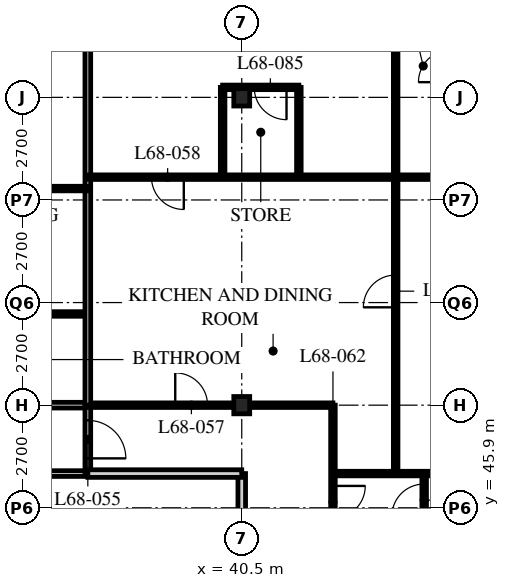
"""IFC4 building model, lengths in metres.
Left out: names, types, materials, properties, quantities, classifications, styles, units other than length and angle.
Written with IfcOpenShell. Run it as: python <this file> out.ifc"""

import sys

from ifc_helpers import new_model, si_unit, direction, frame, frame_2d, origin, origin_2d, place, context, subcontext, project, spatial, rectangle, i_section, extrude, element, fill, save


model = new_model("IFC4")
c1 = context("Model", 3, precision=1e-05, world=origin(), true_north=direction((0.0, 1.0)))
c2 = subcontext(c1, "Body", "Model", "MODEL_VIEW")
j1 = project(units=[si_unit("LENGTHUNIT", "METRE"), si_unit("PLANEANGLEUNIT", "RADIAN")], contexts=[c1])
p1 = place(None, origin())
s1 = spatial("IfcSite", under=j1, at=p1, CompositionType="ELEMENT")
p2 = place(p1, origin())
s2 = spatial("IfcBuilding", under=s1, at=p2, CompositionType="ELEMENT")
p3 = place(p2, frame((0.0, 0.0, 265.8)))
s3 = spatial("IfcBuildingStorey", under=s2, at=p3, CompositionType="ELEMENT", Elevation=265.8)
for number, where, z_axis, x_axis in (
    (1, (40.5, 48.6, 0.0), (0.0, 0.0, 1.0), (1.0, 0.0, 0.0)),
    (2, (40.5, 56.7, 0.0), (0.0, 0.0, 1.0), (1.0, 0.0, 0.0)),
):
    element("IfcColumn", number, at=place(p3, frame(where, z_axis=z_axis, x_axis=x_axis)), inside=s3, PredefinedType="COLUMN", context=c2, shape_type="SweptSolid", body=[
        extrude(i_section(OverallWidth=0.418, OverallDepth=0.456, WebThickness=0.042, FlangeThickness=0.067, FilletRadius=0.015, at=origin_2d()), origin(), (0.0, 0.0, 1.0), 3.9),
    ])
p4 = place(p3, frame((8.1, 48.6, 0.0), z_axis=(0.0, 0.0, 1.0), x_axis=(1.0, 0.0, 0.0)))
e3 = element("IfcWall", 3, at=p4, inside=s3, PredefinedType="PARTITIONING", context=c2, shape_type="SweptSolid", body=[
    extrude(rectangle(XDim=28.35, YDim=0.15, at=frame_2d((14.175, 0.0))), origin(), (0.0, 0.0, 1.0), 3.078),
])
p5 = place(p4, frame((4.45, 0.0, 0.0)))
e4 = element("IfcOpeningElement", 4, at=p5, cuts=e3, PredefinedType="OPENING", context=c2, shape_type="SweptSolid", body=[
    extrude(rectangle(XDim=1.0, YDim=2.1, at=frame_2d((0.5, 1.05))), frame((0.0, 0.085, 0.0), z_axis=(0.0, -1.0, 0.0), x_axis=(1.0, 0.0, 0.0)), (0.0, 0.0, 1.0), 0.17),
])
p6 = place(p4, frame((20.65, 0.0, 0.0)))
e5 = element("IfcOpeningElement", 5, at=p6, cuts=e3, PredefinedType="OPENING", context=c2, shape_type="SweptSolid", body=[
    extrude(rectangle(XDim=1.0, YDim=2.1, at=frame_2d((0.5, 1.05))), frame((0.0, 0.085, 0.0), z_axis=(0.0, -1.0, 0.0), x_axis=(1.0, 0.0, 0.0)), (0.0, 0.0, 1.0), 0.17),
])
p7 = place(p4, frame((1.525, 0.0, 0.0)))
e6 = element("IfcOpeningElement", 6, at=p7, cuts=e3, PredefinedType="OPENING", context=c2, shape_type="SweptSolid", body=[
    extrude(rectangle(XDim=1.0, YDim=2.1, at=frame_2d((0.5, 1.05))), frame((0.0, 0.085, 0.0), z_axis=(0.0, -1.0, 0.0), x_axis=(1.0, 0.0, 0.0)), (0.0, 0.0, 1.0), 0.17),
])
p8 = place(p3, frame((29.56, 46.8, 0.0), z_axis=(0.0, 0.0, 1.0), x_axis=(1.0, 0.0, 0.0)))
e7 = element("IfcWall", 7, at=p8, inside=s3, PredefinedType="PARTITIONING", context=c2, shape_type="SweptSolid", body=[
    extrude(rectangle(XDim=6.89, YDim=0.15, at=frame_2d((3.445, 0.0))), origin(), (0.0, 0.0, 1.0), 3.69),
])
p9 = place(p8, frame((0.442, 0.0, 0.0)))
e8 = element("IfcOpeningElement", 8, at=p9, cuts=e7, PredefinedType="OPENING", context=c2, shape_type="SweptSolid", body=[
    extrude(rectangle(XDim=1.0, YDim=2.1, at=frame_2d((0.5, 1.05))), frame((0.0, 0.085, 0.0), z_axis=(0.0, -1.0, 0.0), x_axis=(1.0, 0.0, 0.0)), (0.0, 0.0, 1.0), 0.17),
])
p10 = place(p8, frame((3.642, 0.0, 0.0)))
e9 = element("IfcOpeningElement", 9, at=p10, cuts=e7, PredefinedType="OPENING", context=c2, shape_type="SweptSolid", body=[
    extrude(rectangle(XDim=1.0, YDim=2.1, at=frame_2d((0.5, 1.05))), frame((0.0, 0.085, 0.0), z_axis=(0.0, -1.0, 0.0), x_axis=(1.0, 0.0, 0.0)), (0.0, 0.0, 1.0), 0.17),
])
p11 = place(p3, frame((36.45, 46.8, 0.0), z_axis=(0.0, 0.0, 1.0), x_axis=(0.0, 1.0, 0.0)))
e10 = element("IfcWall", 10, at=p11, inside=s3, PredefinedType="PARTITIONING", context=c2, shape_type="SweptSolid", body=[
    extrude(rectangle(XDim=1.8, YDim=0.15, at=frame_2d((0.9, 0.0))), origin(), (0.0, 0.0, 1.0), 3.69),
])
p12 = place(p11, frame((0.4, 0.0, 0.0)))
e11 = element("IfcOpeningElement", 11, at=p12, cuts=e10, PredefinedType="OPENING", context=c2, shape_type="SweptSolid", body=[
    extrude(rectangle(XDim=1.0, YDim=2.1, at=frame_2d((0.5, 1.05))), frame((0.0, 0.085, 0.0), z_axis=(0.0, -1.0, 0.0), x_axis=(1.0, 0.0, 0.0)), (0.0, 0.0, 1.0), 0.17),
])
p13 = place(p3, frame((40.5, 40.5, 0.0), z_axis=(0.0, 0.0, 1.0), x_axis=(0.0, 1.0, 0.0)))
e12 = element("IfcWall", 12, at=p13, inside=s3, PredefinedType="SOLIDWALL", context=c2, shape_type="SweptSolid", body=[
    extrude(rectangle(XDim=6.3, YDim=0.2, at=frame_2d((3.15, 0.0))), origin(), (0.0, 0.0, 1.0), 3.078),
])
p14 = place(p3, frame((4.1, 51.0, 0.0), z_axis=(0.0, 0.0, 1.0), x_axis=(1.0, 0.0, 0.0)))
e13 = element("IfcWall", 13, at=p14, inside=s3, PredefinedType="PARTITIONING", context=c2, shape_type="SweptSolid", body=[
    extrude(rectangle(XDim=32.35, YDim=0.12, at=frame_2d((16.175, 0.0))), origin(), (0.0, 0.0, 1.0), 3.69),
])
p15 = place(p14, frame((9.025, 0.0, 0.0)))
e14 = element("IfcOpeningElement", 14, at=p15, cuts=e13, PredefinedType="OPENING", context=c2, shape_type="SweptSolid", body=[
    extrude(rectangle(XDim=0.85, YDim=2.1, at=frame_2d((0.425, 1.05))), frame((0.0, 0.07, 0.0), z_axis=(0.0, -1.0, 0.0), x_axis=(1.0, 0.0, 0.0)), (0.0, 0.0, 1.0), 0.14),
])
p16 = place(p14, frame((16.475, 0.0, 0.0)))
e15 = element("IfcOpeningElement", 15, at=p16, cuts=e13, PredefinedType="OPENING", context=c2, shape_type="SweptSolid", body=[
    extrude(rectangle(XDim=0.85, YDim=2.1, at=frame_2d((0.425, 1.05))), frame((0.0, 0.07, 0.0), z_axis=(0.0, -1.0, 0.0), x_axis=(1.0, 0.0, 0.0)), (0.0, 0.0, 1.0), 0.14),
])
p17 = place(p14, frame((20.525, 0.0, 0.0)))
e16 = element("IfcOpeningElement", 16, at=p17, cuts=e13, PredefinedType="OPENING", context=c2, shape_type="SweptSolid", body=[
    extrude(rectangle(XDim=0.85, YDim=2.1, at=frame_2d((0.425, 1.05))), frame((0.0, 0.07, 0.0), z_axis=(0.0, -1.0, 0.0), x_axis=(1.0, 0.0, 0.0)), (0.0, 0.0, 1.0), 0.14),
])
p18 = place(p14, frame((25.225, 0.0, 0.0)))
e17 = element("IfcOpeningElement", 17, at=p18, cuts=e13, PredefinedType="OPENING", context=c2, shape_type="SweptSolid", body=[
    extrude(rectangle(XDim=0.85, YDim=2.1, at=frame_2d((0.425, 1.05))), frame((0.0, 0.07, 0.0), z_axis=(0.0, -1.0, 0.0), x_axis=(1.0, 0.0, 0.0)), (0.0, 0.0, 1.0), 0.14),
])
p19 = place(p14, frame((28.625, 0.0, 0.0)))
e18 = element("IfcOpeningElement", 18, at=p19, cuts=e13, PredefinedType="OPENING", context=c2, shape_type="SweptSolid", body=[
    extrude(rectangle(XDim=0.85, YDim=2.1, at=frame_2d((0.425, 1.05))), frame((0.0, 0.07, 0.0), z_axis=(0.0, -1.0, 0.0), x_axis=(1.0, 0.0, 0.0)), (0.0, 0.0, 1.0), 0.14),
])
p20 = place(p14, frame((6.725, 0.0, 0.0)))
e19 = element("IfcOpeningElement", 19, at=p20, cuts=e13, PredefinedType="OPENING", context=c2, shape_type="SweptSolid", body=[
    extrude(rectangle(XDim=0.85, YDim=2.1, at=frame_2d((0.425, 1.05))), frame((0.0, 0.07, 0.0), z_axis=(0.0, -1.0, 0.0), x_axis=(1.0, 0.0, 0.0)), (0.0, 0.0, 1.0), 0.14),
])
p21 = place(p14, frame((2.875, 0.0, 0.0)))
e20 = element("IfcOpeningElement", 20, at=p21, cuts=e13, PredefinedType="OPENING", context=c2, shape_type="SweptSolid", body=[
    extrude(rectangle(XDim=0.85, YDim=2.1, at=frame_2d((0.425, 1.05))), frame((0.0, 0.07, 0.0), z_axis=(0.0, -1.0, 0.0), x_axis=(1.0, 0.0, 0.0)), (0.0, 0.0, 1.0), 0.14),
])
p22 = place(p3, frame((42.9, 48.6, 0.0), z_axis=(0.0, 0.0, 1.0), x_axis=(0.0, -1.0, 0.0)))
e21 = element("IfcWall", 21, at=p22, inside=s3, PredefinedType="PARTITIONING", context=c2, shape_type="SweptSolid", body=[
    extrude(rectangle(XDim=16.2, YDim=0.12, at=frame_2d((8.1, 0.0))), origin(), (0.0, 0.0, 1.0), 3.69),
])
p23 = place(p22, frame((2.125, 0.0, 0.0)))
e22 = element("IfcOpeningElement", 22, at=p23, cuts=e21, PredefinedType="OPENING", context=c2, shape_type="SweptSolid", body=[
    extrude(rectangle(XDim=0.85, YDim=2.1, at=frame_2d((0.425, 1.05))), frame((0.0, 0.07, 0.0), z_axis=(0.0, -1.0, 0.0), x_axis=(1.0, 0.0, 0.0)), (0.0, 0.0, 1.0), 0.14),
])
p24 = place(p22, frame((8.425, 0.0, 0.0)))
e23 = element("IfcOpeningElement", 23, at=p24, cuts=e21, PredefinedType="OPENING", context=c2, shape_type="SweptSolid", body=[
    extrude(rectangle(XDim=0.85, YDim=2.1, at=frame_2d((0.425, 1.05))), frame((0.0, 0.07, 0.0), z_axis=(0.0, -1.0, 0.0), x_axis=(1.0, 0.0, 0.0)), (0.0, 0.0, 1.0), 0.14),
])
p25 = place(p22, frame((12.475, 0.0, 0.0)))
e24 = element("IfcOpeningElement", 24, at=p25, cuts=e21, PredefinedType="OPENING", context=c2, shape_type="SweptSolid", body=[
    extrude(rectangle(XDim=0.85, YDim=2.1, at=frame_2d((0.425, 1.05))), frame((0.0, 0.07, 0.0), z_axis=(0.0, -1.0, 0.0), x_axis=(1.0, 0.0, 0.0)), (0.0, 0.0, 1.0), 0.14),
])
p26 = place(p3, frame((36.45, 48.6, 0.0), z_axis=(0.0, 0.0, 1.0), x_axis=(1.0, 0.0, 0.0)))
e25 = element("IfcWall", 25, at=p26, inside=s3, PredefinedType="PARTITIONING", context=c2, shape_type="SweptSolid", body=[
    extrude(rectangle(XDim=6.45, YDim=0.12, at=frame_2d((3.225, 0.0))), origin(), (0.0, 0.0, 1.0), 3.078),
])
p27 = place(p26, frame((2.3, 0.0, 0.0)))
e26 = element("IfcOpeningElement", 26, at=p27, cuts=e25, PredefinedType="OPENING", context=c2, shape_type="SweptSolid", body=[
    extrude(rectangle(XDim=0.85, YDim=2.1, at=frame_2d((0.425, 1.05))), frame((0.0, 0.07, 0.0), z_axis=(0.0, -1.0, 0.0), x_axis=(1.0, 0.0, 0.0)), (0.0, 0.0, 1.0), 0.14),
])
p28 = place(p3, frame((36.45, 46.8, 0.0), z_axis=(0.0, 0.0, 1.0), x_axis=(1.0, 0.0, 0.0)))
e27 = element("IfcWall", 27, at=p28, inside=s3, PredefinedType="SOLIDWALL", context=c2, shape_type="SweptSolid", body=[
    extrude(rectangle(XDim=4.05, YDim=0.2, at=frame_2d((2.025, 0.0))), origin(), (0.0, 0.0, 1.0), 3.69),
])
p29 = place(p3, frame((42.9, 46.8, 0.0), z_axis=(0.0, 0.0, 1.0), x_axis=(1.0, 0.0, 0.0)))
e28 = element("IfcWall", 28, at=p29, inside=s3, PredefinedType="PARTITIONING", context=c2, shape_type="SweptSolid", body=[
    extrude(rectangle(XDim=13.5, YDim=0.12, at=frame_2d((6.75, 0.0))), origin(), (0.0, 0.0, 1.0), 3.69),
])
p30 = place(p3, frame((36.45, 64.5, 0.0), z_axis=(0.0, 0.0, 1.0), x_axis=(0.0, -1.0, 0.0)))
e29 = element("IfcWall", 29, at=p30, inside=s3, PredefinedType="PARTITIONING", context=c2, shape_type="SweptSolid", body=[
    extrude(rectangle(XDim=15.9, YDim=0.15, at=frame_2d((7.95, 0.0))), origin(), (0.0, 0.0, 1.0), 3.69),
])
p31 = place(p3, frame((36.45, 54.6, 0.0), z_axis=(0.0, 0.0, 1.0), x_axis=(1.0, 0.0, 0.0)))
e30 = element("IfcWall", 30, at=p31, inside=s3, PredefinedType="PARTITIONING", context=c2, shape_type="SweptSolid", body=[
    extrude(rectangle(XDim=19.95, YDim=0.12, at=frame_2d((9.975, 0.0))), origin(), (0.0, 0.0, 1.0), 3.69),
])
p32 = place(p31, frame((1.675, 0.0, 0.0)))
e31 = element("IfcOpeningElement", 31, at=p32, cuts=e30, PredefinedType="OPENING", context=c2, shape_type="SweptSolid", body=[
    extrude(rectangle(XDim=0.85, YDim=2.1, at=frame_2d((0.425, 1.05))), frame((0.0, 0.07, 0.0), z_axis=(0.0, -1.0, 0.0), x_axis=(1.0, 0.0, 0.0)), (0.0, 0.0, 1.0), 0.14),
])
p33 = place(p3, frame((44.55, 64.5, 0.0), z_axis=(0.0, 0.0, 1.0), x_axis=(0.0, -1.0, 0.0)))
e32 = element("IfcWall", 32, at=p33, inside=s3, PredefinedType="PARTITIONING", context=c2, shape_type="SweptSolid", body=[
    extrude(rectangle(XDim=17.7, YDim=0.12, at=frame_2d((8.85, 0.0))), origin(), (0.0, 0.0, 1.0), 3.69),
])
p34 = place(p33, frame((12.475, 0.0, 0.0)))
e33 = element("IfcOpeningElement", 33, at=p34, cuts=e32, PredefinedType="OPENING", context=c2, shape_type="SweptSolid", body=[
    extrude(rectangle(XDim=0.85, YDim=2.1, at=frame_2d((0.425, 1.05))), frame((0.0, 0.07, 0.0), z_axis=(0.0, -1.0, 0.0), x_axis=(1.0, 0.0, 0.0)), (0.0, 0.0, 1.0), 0.14),
])
p35 = place(p33, frame((4.525, 0.0, 0.0)))
e34 = element("IfcOpeningElement", 34, at=p35, cuts=e32, PredefinedType="OPENING", context=c2, shape_type="SweptSolid", body=[
    extrude(rectangle(XDim=0.85, YDim=2.1, at=frame_2d((0.425, 1.05))), frame((0.0, 0.07, 0.0), z_axis=(0.0, -1.0, 0.0), x_axis=(1.0, 0.0, 0.0)), (0.0, 0.0, 1.0), 0.14),
])
p36 = place(p3, frame((45.3, 46.8, 0.0), z_axis=(0.0, 0.0, 1.0), x_axis=(0.0, -1.0, 0.0)))
e35 = element("IfcWall", 35, at=p36, inside=s3, PredefinedType="PARTITIONING", context=c2, shape_type="SweptSolid", body=[
    extrude(rectangle(XDim=4.01, YDim=0.12, at=frame_2d((2.005, 0.0))), origin(), (0.0, 0.0, 1.0), 3.69),
])
p37 = place(p36, frame((0.275, 0.0, 0.0)))
e36 = element("IfcOpeningElement", 36, at=p37, cuts=e35, PredefinedType="OPENING", context=c2, shape_type="SweptSolid", body=[
    extrude(rectangle(XDim=0.85, YDim=2.1, at=frame_2d((0.425, 1.05))), frame((0.0, 0.07, 0.0), z_axis=(0.0, -1.0, 0.0), x_axis=(1.0, 0.0, 0.0)), (0.0, 0.0, 1.0), 0.14),
])
p38 = place(p3, frame((32.4, 54.3, 0.0), z_axis=(0.0, 0.0, 1.0), x_axis=(1.0, 0.0, 0.0)))
e37 = element("IfcWall", 37, at=p38, inside=s3, PredefinedType="PARTITIONING", context=c2, shape_type="SweptSolid", body=[
    extrude(rectangle(XDim=4.05, YDim=0.12, at=frame_2d((2.025, 0.0))), origin(), (0.0, 0.0, 1.0), 3.69),
])
p39 = place(p38, frame((1.6, 0.0, 0.0)))
e38 = element("IfcOpeningElement", 38, at=p39, cuts=e37, PredefinedType="OPENING", context=c2, shape_type="SweptSolid", body=[
    extrude(rectangle(XDim=0.85, YDim=2.1, at=frame_2d((0.425, 1.05))), frame((0.0, 0.07, 0.0), z_axis=(0.0, -1.0, 0.0), x_axis=(1.0, 0.0, 0.0)), (0.0, 0.0, 1.0), 0.14),
])
for number, where, z_axis, x_axis in (
    (39, (39.997, 54.6, 0.0), (0.0, 0.0, 1.0), (0.0, 1.0, 0.0)),
    (40, (42.003, 54.6, 0.0), (0.0, 0.0, 1.0), (0.0, 1.0, 0.0)),
):
    element("IfcWall", number, at=place(p3, frame(where, z_axis=z_axis, x_axis=x_axis)), inside=s3, PredefinedType="PARTITIONING", context=c2, shape_type="SweptSolid", body=[
        extrude(rectangle(XDim=2.363, YDim=0.12, at=frame_2d((1.181, 0.0))), origin(), (0.0, 0.0, 1.0), 3.69),
    ])
p40 = place(p3, frame((39.997, 56.963, 0.0), z_axis=(0.0, 0.0, 1.0), x_axis=(1.0, 0.0, 0.0)))
e41 = element("IfcWall", 41, at=p40, inside=s3, PredefinedType="PARTITIONING", context=c2, shape_type="SweptSolid", body=[
    extrude(rectangle(XDim=2.006, YDim=0.12, at=frame_2d((1.003, 0.0))), origin(), (0.0, 0.0, 1.0), 3.69),
])
p41 = place(p40, frame((0.831, 0.0, 0.0)))
e42 = element("IfcOpeningElement", 42, at=p41, cuts=e41, PredefinedType="OPENING", context=c2, shape_type="SweptSolid", body=[
    extrude(rectangle(XDim=0.85, YDim=2.1, at=frame_2d((0.425, 1.05))), frame((0.0, 0.07, 0.0), z_axis=(0.0, -1.0, 0.0), x_axis=(1.0, 0.0, 0.0)), (0.0, 0.0, 1.0), 0.14),
])
p42 = place(p12, origin())
e43 = element("IfcDoor", 43, at=p42, inside=s3, OperationType="SINGLE_SWING_RIGHT", PredefinedType="DOOR", context=c2, shape_type="SweptSolid", body=[
    extrude(rectangle(XDim=1.0, YDim=2.1, at=frame_2d((0.5, 1.05))), frame((0.0, 0.025, 0.0), z_axis=(0.0, -1.0, 0.0), x_axis=(1.0, 0.0, 0.0)), (0.0, 0.0, 1.0), 0.05),
])
fill(e11, e43)
p43 = place(p27, origin())
e44 = element("IfcDoor", 44, at=p43, inside=s3, OperationType="SINGLE_SWING_LEFT", PredefinedType="DOOR", context=c2, shape_type="SweptSolid", body=[
    extrude(rectangle(XDim=0.85, YDim=2.1, at=frame_2d((0.425, 1.05))), frame((0.0, 0.025, 0.0), z_axis=(0.0, -1.0, 0.0), x_axis=(1.0, 0.0, 0.0)), (0.0, 0.0, 1.0), 0.05),
])
fill(e26, e44)
p44 = place(p32, origin())
e45 = element("IfcDoor", 45, at=p44, inside=s3, OperationType="SINGLE_SWING_LEFT", PredefinedType="DOOR", context=c2, shape_type="SweptSolid", body=[
    extrude(rectangle(XDim=0.85, YDim=2.1, at=frame_2d((0.425, 1.05))), frame((0.0, 0.025, 0.0), z_axis=(0.0, -1.0, 0.0), x_axis=(1.0, 0.0, 0.0)), (0.0, 0.0, 1.0), 0.05),
])
fill(e31, e45)
p45 = place(p34, origin())
e46 = element("IfcDoor", 46, at=p45, inside=s3, OperationType="SINGLE_SWING_LEFT", PredefinedType="DOOR", context=c2, shape_type="SweptSolid", body=[
    extrude(rectangle(XDim=0.85, YDim=2.1, at=frame_2d((0.425, 1.05))), frame((0.0, 0.025, 0.0), z_axis=(0.0, -1.0, 0.0), x_axis=(1.0, 0.0, 0.0)), (0.0, 0.0, 1.0), 0.05),
])
fill(e33, e46)
p46 = place(p23, origin())
e47 = element("IfcDoor", 47, at=p46, inside=s3, OperationType="SINGLE_SWING_LEFT", PredefinedType="DOOR", context=c2, shape_type="SweptSolid", body=[
    extrude(rectangle(XDim=0.85, YDim=2.1, at=frame_2d((0.425, 1.05))), frame((0.0, 0.025, 0.0), z_axis=(0.0, -1.0, 0.0), x_axis=(1.0, 0.0, 0.0)), (0.0, 0.0, 1.0), 0.05),
])
fill(e22, e47)
p47 = place(p37, origin())
e48 = element("IfcDoor", 48, at=p47, inside=s3, OperationType="SINGLE_SWING_LEFT", PredefinedType="DOOR", context=c2, shape_type="SweptSolid", body=[
    extrude(rectangle(XDim=0.85, YDim=2.1, at=frame_2d((0.425, 1.05))), frame((0.0, 0.025, 0.0), z_axis=(0.0, -1.0, 0.0), x_axis=(1.0, 0.0, 0.0)), (0.0, 0.0, 1.0), 0.05),
])
fill(e36, e48)
p48 = place(p41, origin())
e49 = element("IfcDoor", 49, at=p48, inside=s3, OperationType="SINGLE_SWING_LEFT", PredefinedType="DOOR", context=c2, shape_type="SweptSolid", body=[
    extrude(rectangle(XDim=0.85, YDim=2.1, at=frame_2d((0.425, 1.05))), frame((0.0, 0.025, 0.0), z_axis=(0.0, -1.0, 0.0), x_axis=(1.0, 0.0, 0.0)), (0.0, 0.0, 1.0), 0.05),
])
fill(e42, e49)
save(model, sys.argv[1])
